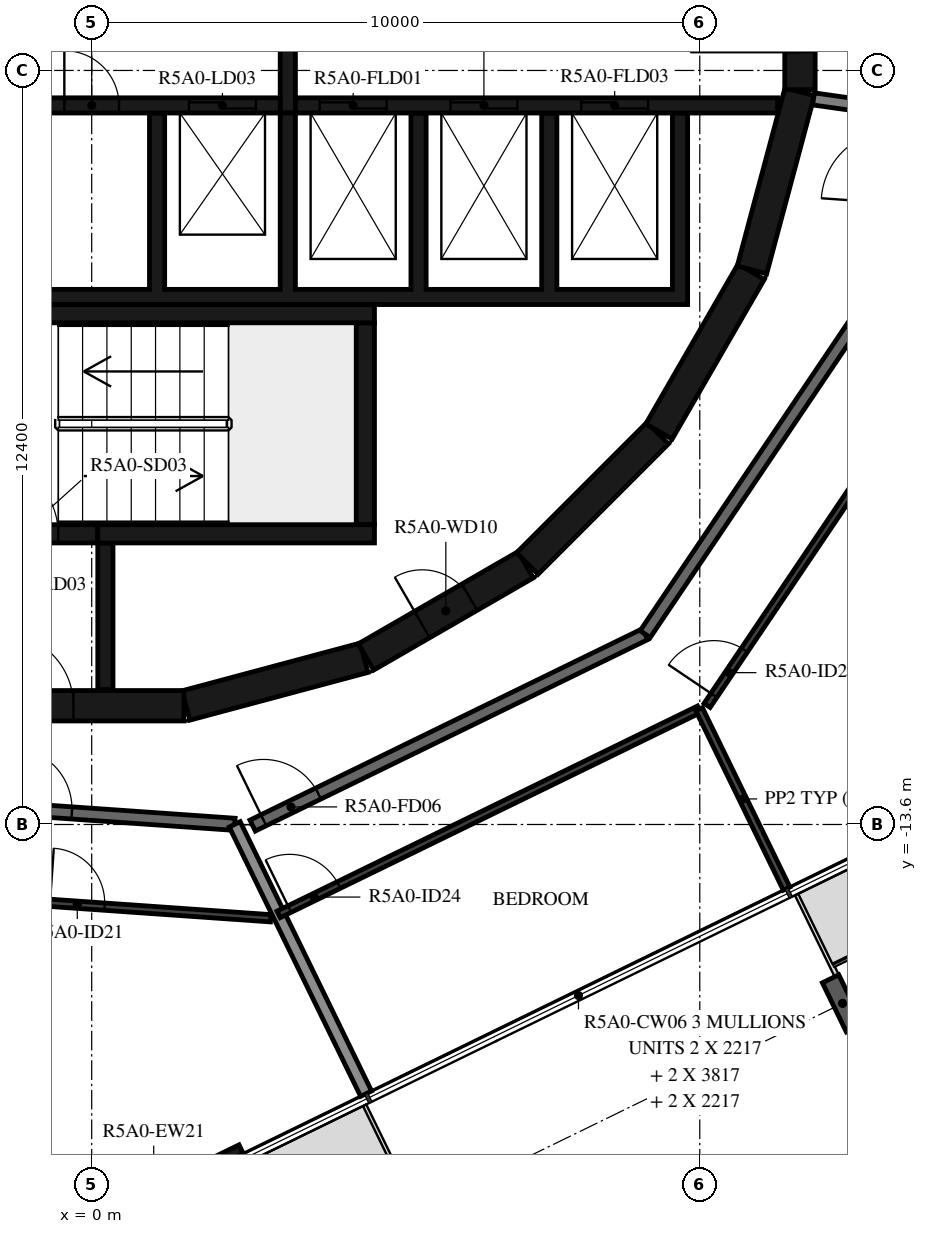
"""IFC4 building model, lengths in metres.
Left out: names, types, materials, properties, quantities, classifications, styles, units other than length and angle.
Written with IfcOpenShell. Run it as: python <this file> out.ifc"""

import sys

from ifc_helpers import new_model, si_unit, direction, frame, frame_2d, origin, origin_2d, place, context, subcontext, project, spatial, polyline, rectangle, i_section, outline, extrude, element, fill, save


model = new_model("IFC4")
c1 = context("Model", 3, precision=1e-05, world=origin(), true_north=direction((0.0, 1.0)))
c2 = subcontext(c1, "Body", "Model", "MODEL_VIEW")
j1 = project(units=[si_unit("LENGTHUNIT", "METRE"), si_unit("PLANEANGLEUNIT", "RADIAN")], contexts=[c1])
p1 = place(None, origin())
s1 = spatial("IfcSite", under=j1, at=p1, CompositionType="ELEMENT")
p2 = place(p1, origin())
s2 = spatial("IfcBuilding", under=s1, at=p2, CompositionType="ELEMENT")
p3 = place(p2, frame((0.0, 0.0, 195.4)))
s3 = spatial("IfcBuildingStorey", under=s2, at=p3, CompositionType="ELEMENT", Elevation=195.4)
p4 = place(p3, frame((12.348, -16.542, -0.38), z_axis=(0.0, 0.0, 1.0), x_axis=(-0.898794095235, -0.438371046456, 0.0)))
e1 = element("IfcColumn", 1, at=p4, inside=s3, PredefinedType="COLUMN", context=c2, shape_type="SweptSolid", body=[
    extrude(i_section(OverallWidth=0.3, OverallDepth=0.9, WebThickness=0.019, FlangeThickness=0.035, FilletRadius=0.03, at=origin_2d()), origin(), (0.0, 0.0, 1.0), 3.5),
])
p5 = place(p3, frame((-0.418, -20.343, 0.0), z_axis=(0.0, 0.0, 1.0), x_axis=(0.898778711213, 0.43840258698, 0.0)))
e2 = element("IfcWall", 2, at=p5, inside=s3, PredefinedType="STANDARD", context=c2, shape_type="SweptSolid", body=[
    extrude(rectangle(XDim=3.2, YDim=0.16, at=frame_2d((1.6, 0.0))), origin(), (0.0, 0.0, 1.0), 3.12),
])
p6 = place(p5, frame((0.4, 0.0, 0.0)))
e3 = element("IfcOpeningElement", 3, at=p6, cuts=e2, PredefinedType="OPENING", context=c2, shape_type="SweptSolid", body=[
    extrude(rectangle(XDim=2.4, YDim=2.4, at=frame_2d((1.2, 1.2))), frame((0.0, 0.09, 0.0), z_axis=(0.0, -1.0, 0.0), x_axis=(1.0, 0.0, 0.0)), (0.0, 0.0, 1.0), 0.18),
])
p7 = place(p3, frame((1.55, -11.643, 0.0), z_axis=(0.0, 0.0, 1.0), x_axis=(0.965948410781, 0.258734743916, 0.0)))
e4 = element("IfcWall", 4, at=p7, inside=s3, PredefinedType="SHEAR", context=c2, shape_type="SweptSolid", body=[
    extrude(rectangle(XDim=3.033, YDim=0.5, at=frame_2d((1.516, 0.0))), origin(), (0.0, 0.0, 1.0), 3.12),
])
p8 = place(p3, frame((4.51, -10.845, 0.0), z_axis=(0.0, 0.0, 1.0), x_axis=(0.865975092491, 0.500087131594, 0.0)))
e5 = element("IfcWall", 5, at=p8, inside=s3, PredefinedType="SHEAR", context=c2, shape_type="SweptSolid", body=[
    extrude(rectangle(XDim=3.033, YDim=0.5, at=frame_2d((1.516, 0.0))), origin(), (0.0, 0.0, 1.0), 3.12),
])
p9 = place(p8, frame((1.066, 0.0, 0.0)))
e6 = element("IfcOpeningElement", 6, at=p9, cuts=e5, PredefinedType="OPENING", context=c2, shape_type="SweptSolid", body=[
    extrude(rectangle(XDim=0.9, YDim=2.1, at=frame_2d((0.45, 1.05))), frame((0.0, 0.26, 0.0), z_axis=(0.0, -1.0, 0.0), x_axis=(1.0, 0.0, 0.0)), (0.0, 0.0, 1.0), 0.52),
])
p10 = place(p3, frame((7.164, -9.308, 0.0), z_axis=(0.0, 0.0, 1.0), x_axis=(0.707106781187, 0.707106781187, 0.0)))
e7 = element("IfcWall", 7, at=p10, inside=s3, PredefinedType="SHEAR", context=c2, shape_type="SweptSolid", body=[
    extrude(rectangle(XDim=3.032, YDim=0.5, at=frame_2d((1.516, 0.0))), origin(), (0.0, 0.0, 1.0), 3.12),
])
for number, where, z_axis, x_axis in (
    (8, (9.329, -7.137, 0.0), (0.0, 0.0, 1.0), (0.5, 0.866, 0.0)),
    (9, (10.858, -4.479, 0.0), (0.0, 0.0, 1.0), (0.259, 0.966, 0.0)),
):
    element("IfcWall", number, at=place(p3, frame(where, z_axis=z_axis, x_axis=x_axis)), inside=s3, PredefinedType="SHEAR", context=c2, shape_type="SweptSolid", body=[
        extrude(rectangle(XDim=3.033, YDim=0.5, at=frame_2d((1.516, 0.0))), origin(), (0.0, 0.0, 1.0), 3.12),
    ])
p11 = place(p3, frame((11.647, -1.516, 0.0), z_axis=(0.0, 0.0, 1.0), x_axis=(0.0, 1.0, 0.0)))
e10 = element("IfcWall", 10, at=p11, inside=s3, PredefinedType="SHEAR", context=c2, shape_type="SweptSolid", body=[
    extrude(rectangle(XDim=3.033, YDim=0.5, at=frame_2d((1.516, 0.0))), origin(), (0.0, 0.0, 1.0), 3.12),
])
p12 = place(p11, frame((0.616, 0.0, 0.0)))
e11 = element("IfcOpeningElement", 11, at=p12, cuts=e10, PredefinedType="OPENING", context=c2, shape_type="SweptSolid", body=[
    extrude(rectangle(XDim=1.8, YDim=2.1, at=frame_2d((0.9, 1.05))), frame((0.0, 0.26, 0.0), z_axis=(0.0, -1.0, 0.0), x_axis=(1.0, 0.0, 0.0)), (0.0, 0.0, 1.0), 0.52),
])
p13 = place(p3, frame((-1.516, -11.647, 0.0), z_axis=(0.0, 0.0, 1.0), x_axis=(1.0, 0.0, 0.0)))
e12 = element("IfcWall", 12, at=p13, inside=s3, PredefinedType="SHEAR", context=c2, shape_type="SweptSolid", body=[
    extrude(rectangle(XDim=3.033, YDim=0.5, at=frame_2d((1.516, 0.0))), origin(), (0.0, 0.0, 1.0), 3.12),
])
p14 = place(p13, frame((0.016, 0.0, 0.0)))
e13 = element("IfcOpeningElement", 13, at=p14, cuts=e12, PredefinedType="OPENING", context=c2, shape_type="SweptSolid", body=[
    extrude(rectangle(XDim=1.2, YDim=2.1, at=frame_2d((0.6, 1.05))), frame((0.0, 0.26, 0.0), z_axis=(0.0, -1.0, 0.0), x_axis=(1.0, 0.0, 0.0)), (0.0, 0.0, 1.0), 0.52),
])
p15 = place(p3, frame((-2.4, -5.2, 0.0), z_axis=(0.0, 0.0, 1.0), x_axis=(1.0, 0.0, 0.0)))
e14 = element("IfcWall", 14, at=p15, inside=s3, PredefinedType="SHEAR", context=c2, shape_type="SweptSolid", body=[
    extrude(rectangle(XDim=7.05, YDim=0.3, at=frame_2d((3.525, 0.0))), origin(), (0.0, 0.0, 1.0), 3.12),
])
p16 = place(p3, frame((4.5, -8.67, 0.0), z_axis=(0.0, 0.0, 1.0), x_axis=(0.0, 1.0, 0.0)))
e15 = element("IfcWall", 15, at=p16, inside=s3, PredefinedType="SHEAR", context=c2, shape_type="SweptSolid", body=[
    extrude(rectangle(XDim=3.32, YDim=0.3, at=frame_2d((1.66, 0.0))), origin(), (0.0, 0.0, 1.0), 3.12),
])
p17 = place(p3, frame((0.1, -8.82, 0.0), z_axis=(0.0, 0.0, 1.0), x_axis=(1.0, 0.0, 0.0)))
e16 = element("IfcWall", 16, at=p17, inside=s3, PredefinedType="SHEAR", context=c2, shape_type="SweptSolid", body=[
    extrude(rectangle(XDim=4.55, YDim=0.3, at=frame_2d((2.275, 0.0))), origin(), (0.0, 0.0, 1.0), 3.12),
])
p18 = place(p3, frame((-2.4, -8.82, 0.0), z_axis=(0.0, 0.0, 1.0), x_axis=(1.0, 0.0, 0.0)))
e17 = element("IfcWall", 17, at=p18, inside=s3, PredefinedType="SHEAR", context=c2, shape_type="SweptSolid", body=[
    extrude(rectangle(XDim=2.5, YDim=0.3, at=frame_2d((1.25, 0.0))), origin(), (0.0, 0.0, 1.0), 3.12),
])
p19 = place(p18, frame((0.65, 0.0, 0.0)))
e18 = element("IfcOpeningElement", 18, at=p19, cuts=e17, PredefinedType="OPENING", context=c2, shape_type="SweptSolid", body=[
    extrude(rectangle(XDim=1.2, YDim=2.1, at=frame_2d((0.6, 1.05))), frame((0.0, 0.16, 0.0), z_axis=(0.0, -1.0, 0.0), x_axis=(1.0, 0.0, 0.0)), (0.0, 0.0, 1.0), 0.32),
])
p20 = place(p3, frame((0.225, -8.97, 0.0), z_axis=(0.0, 0.0, 1.0), x_axis=(0.0, -1.0, 0.0)))
e19 = element("IfcWall", 19, at=p20, inside=s3, PredefinedType="SHEAR", context=c2, shape_type="SweptSolid", body=[
    extrude(rectangle(XDim=2.41, YDim=0.25, at=frame_2d((1.205, 0.0))), origin(), (0.0, 0.0, 1.0), 3.12),
])
p21 = place(p3, origin())
e20 = element("IfcWall", 20, at=p21, inside=s3, PredefinedType="SHEAR", context=c2, shape_type="SweptSolid", body=[
    extrude(outline(polyline([(9.8, -5.05), (9.8, -4.8), (9.8, -1.9), (9.55, -1.9), (9.55, -4.8), (7.65, -4.8), (7.65, -1.9), (7.4, -1.9), (7.4, -4.8), (5.5, -4.8), (5.5, -1.9), (5.25, -1.9), (5.25, -4.8), (3.35, -4.8), (3.35, -1.9), (3.1, -1.9), (3.1, -4.8), (1.2, -4.8), (1.2, -1.9), (0.95, -1.9), (0.95, -4.8), (-0.95, -4.8), (-0.95, -1.9), (-1.2, -1.9), (-1.2, -4.8), (-3.1, -4.8), (-3.1, -1.9), (-3.35, -1.9), (-3.35, -4.8), (-5.25, -4.8), (-5.25, -1.9), (-5.5, -1.9), (-5.5, -4.8), (-7.4, -4.8), (-7.4, -1.9), (-7.65, -1.9), (-7.65, -4.8), (-9.55, -4.8), (-9.55, -1.9), (-9.8, -1.9), (-9.8, -4.8), (-9.8, -5.05), (9.8, -5.05)])), origin(), (0.0, 0.0, 1.0), 3.12),
])
p22 = place(p3, frame((-11.28, -1.775, 0.0), z_axis=(0.0, 0.0, 1.0), x_axis=(1.0, 0.0, 0.0)))
e21 = element("IfcWall", 21, at=p22, inside=s3, PredefinedType="SHEAR", context=c2, shape_type="SweptSolid", body=[
    extrude(rectangle(XDim=14.38, YDim=0.25, at=frame_2d((7.19, 0.0))), origin(), (0.0, 0.0, 1.0), 3.12),
])
p23 = place(p22, frame((12.88, 0.0, 0.0)))
e22 = element("IfcOpeningElement", 22, at=p23, cuts=e21, PredefinedType="OPENING", context=c2, shape_type="SweptSolid", body=[
    extrude(rectangle(XDim=1.1, YDim=2.1, at=frame_2d((0.55, 1.05))), frame((0.0, 0.135, 0.0), z_axis=(0.0, -1.0, 0.0), x_axis=(1.0, 0.0, 0.0)), (0.0, 0.0, 1.0), 0.27),
])
p24 = place(p22, frame((6.53, 0.0, 0.0)))
e23 = element("IfcOpeningElement", 23, at=p24, cuts=e21, PredefinedType="OPENING", context=c2, shape_type="SweptSolid", body=[
    extrude(rectangle(XDim=0.9, YDim=2.1, at=frame_2d((0.45, 1.05))), frame((0.0, 0.135, 0.0), z_axis=(0.0, -1.0, 0.0), x_axis=(1.0, 0.0, 0.0)), (0.0, 0.0, 1.0), 0.27),
])
p25 = place(p22, frame((8.68, 0.0, 0.0)))
e24 = element("IfcOpeningElement", 24, at=p25, cuts=e21, PredefinedType="OPENING", context=c2, shape_type="SweptSolid", body=[
    extrude(rectangle(XDim=0.9, YDim=2.1, at=frame_2d((0.45, 1.05))), frame((0.0, 0.135, 0.0), z_axis=(0.0, -1.0, 0.0), x_axis=(1.0, 0.0, 0.0)), (0.0, 0.0, 1.0), 0.27),
])
p26 = place(p22, frame((10.83, 0.0, 0.0)))
e25 = element("IfcOpeningElement", 25, at=p26, cuts=e21, PredefinedType="OPENING", context=c2, shape_type="SweptSolid", body=[
    extrude(rectangle(XDim=0.9, YDim=2.1, at=frame_2d((0.45, 1.05))), frame((0.0, 0.135, 0.0), z_axis=(0.0, -1.0, 0.0), x_axis=(1.0, 0.0, 0.0)), (0.0, 0.0, 1.0), 0.27),
])
p27 = place(p3, frame((3.35, -1.775, 0.0), z_axis=(0.0, 0.0, 1.0), x_axis=(1.0, 0.0, 0.0)))
e26 = element("IfcWall", 26, at=p27, inside=s3, PredefinedType="SHEAR", context=c2, shape_type="SweptSolid", body=[
    extrude(rectangle(XDim=7.93, YDim=0.25, at=frame_2d((3.965, 0.0))), origin(), (0.0, 0.0, 1.0), 3.12),
])
p28 = place(p27, frame((0.4, 0.0, 0.0)))
e27 = element("IfcOpeningElement", 27, at=p28, cuts=e26, PredefinedType="OPENING", context=c2, shape_type="SweptSolid", body=[
    extrude(rectangle(XDim=1.1, YDim=2.4, at=frame_2d((0.55, 1.2))), frame((0.0, 0.135, 0.0), z_axis=(0.0, -1.0, 0.0), x_axis=(1.0, 0.0, 0.0)), (0.0, 0.0, 1.0), 0.27),
])
p29 = place(p27, frame((2.55, 0.0, 0.0)))
e28 = element("IfcOpeningElement", 28, at=p29, cuts=e26, PredefinedType="OPENING", context=c2, shape_type="SweptSolid", body=[
    extrude(rectangle(XDim=1.1, YDim=2.4, at=frame_2d((0.55, 1.2))), frame((0.0, 0.135, 0.0), z_axis=(0.0, -1.0, 0.0), x_axis=(1.0, 0.0, 0.0)), (0.0, 0.0, 1.0), 0.27),
])
p30 = place(p27, frame((4.7, 0.0, 0.0)))
e29 = element("IfcOpeningElement", 29, at=p30, cuts=e26, PredefinedType="OPENING", context=c2, shape_type="SweptSolid", body=[
    extrude(rectangle(XDim=1.1, YDim=2.4, at=frame_2d((0.55, 1.2))), frame((0.0, 0.135, 0.0), z_axis=(0.0, -1.0, 0.0), x_axis=(1.0, 0.0, 0.0)), (0.0, 0.0, 1.0), 0.27),
])
p31 = place(p3, frame((3.225, -1.9, 0.0), z_axis=(0.0, 0.0, 1.0), x_axis=(0.0, 1.0, 0.0)))
e30 = element("IfcWall", 30, at=p31, inside=s3, PredefinedType="SHEAR", context=c2, shape_type="SweptSolid", body=[
    extrude(rectangle(XDim=3.8, YDim=0.25, at=frame_2d((1.9, 0.0))), origin(), (0.0, 0.0, 1.0), 3.12),
])
p32 = place(p3, frame((13.302, -1.869, 0.0), z_axis=(0.0, 0.0, 1.0), x_axis=(-0.990274397042, 0.13912806533, 0.0)))
e31 = element("IfcWall", 31, at=p32, inside=s3, PredefinedType="STANDARD", context=c2, shape_type="SweptSolid", body=[
    extrude(rectangle(XDim=1.446, YDim=0.2, at=frame_2d((0.723, 0.0))), origin(), (0.0, 0.0, 1.0), 3.12),
])
p33 = place(p3, frame((-4.517, -13.117, 0.0), z_axis=(0.0, 0.0, 1.0), x_axis=(0.997564669554, -0.069747616856, 0.0)))
e32 = element("IfcWall", 32, at=p33, inside=s3, PredefinedType="STANDARD", context=c2, shape_type="SweptSolid", body=[
    extrude(rectangle(XDim=6.885, YDim=0.2, at=frame_2d((3.443, 0.0))), origin(), (0.0, 0.0, 1.0), 3.12),
])
p34 = place(p33, frame((3.2, 0.0, 0.0)))
e33 = element("IfcOpeningElement", 33, at=p34, cuts=e32, PredefinedType="OPENING", context=c2, shape_type="SweptSolid", body=[
    extrude(rectangle(XDim=1.0, YDim=2.1, at=frame_2d((0.5, 1.05))), frame((0.0, 0.11, 0.0), z_axis=(0.0, -1.0, 0.0), x_axis=(1.0, 0.0, 0.0)), (0.0, 0.0, 1.0), 0.22),
])
p35 = place(p3, frame((2.647, -13.618, 0.0), z_axis=(0.0, 0.0, 1.0), x_axis=(0.898796543751, 0.438366026218, 0.0)))
e34 = element("IfcWall", 34, at=p35, inside=s3, PredefinedType="STANDARD", context=c2, shape_type="SweptSolid", body=[
    extrude(rectangle(XDim=7.181, YDim=0.2, at=frame_2d((3.591, 0.0))), origin(), (0.0, 0.0, 1.0), 3.12),
])
p36 = place(p35, frame((0.2, 0.0, 0.0)))
e35 = element("IfcOpeningElement", 35, at=p36, cuts=e34, PredefinedType="OPENING", context=c2, shape_type="SweptSolid", body=[
    extrude(rectangle(XDim=1.0, YDim=2.1, at=frame_2d((0.5, 1.05))), frame((0.0, 0.11, 0.0), z_axis=(0.0, -1.0, 0.0), x_axis=(1.0, 0.0, 0.0)), (0.0, 0.0, 1.0), 0.22),
])
p37 = place(p3, frame((9.101, -10.47, 0.0), z_axis=(0.0, 0.0, 1.0), x_axis=(0.559195469534, 0.829035841718, 0.0)))
e36 = element("IfcWall", 36, at=p37, inside=s3, PredefinedType="STANDARD", context=c2, shape_type="SweptSolid", body=[
    extrude(rectangle(XDim=7.181, YDim=0.2, at=frame_2d((3.591, 0.0))), origin(), (0.0, 0.0, 1.0), 3.12),
])
p38 = place(p3, frame((4.512, -18.027, 0.0), z_axis=(0.0, 0.0, 1.0), x_axis=(-0.438374835386, 0.898792247241, 0.0)))
e37 = element("IfcWall", 37, at=p38, inside=s3, PredefinedType="STANDARD", context=c2, shape_type="SweptSolid", body=[
    extrude(rectangle(XDim=4.929, YDim=0.2, at=frame_2d((2.464, 0.0))), origin(), (0.0, 0.0, 1.0), 2.73),
])
p39 = place(p3, frame((-5.022, -14.585, 0.0), z_axis=(0.0, 0.0, 1.0), x_axis=(0.997565118395, -0.069741197017, 0.0)))
e38 = element("IfcWall", 38, at=p39, inside=s3, PredefinedType="PARTITIONING", context=c2, shape_type="SweptSolid", body=[
    extrude(rectangle(XDim=7.985, YDim=0.12, at=frame_2d((3.993, 0.0))), origin(), (0.0, 0.0, 1.0), 3.12),
])
p40 = place(p39, frame((4.346, 0.0, 0.0)))
e39 = element("IfcOpeningElement", 39, at=p40, cuts=e38, PredefinedType="OPENING", context=c2, shape_type="SweptSolid", body=[
    extrude(rectangle(XDim=0.9, YDim=2.1, at=frame_2d((0.45, 1.05))), frame((0.0, 0.07, 0.0), z_axis=(0.0, -1.0, 0.0), x_axis=(1.0, 0.0, 0.0)), (0.0, 0.0, 1.0), 0.14),
])
p41 = place(p3, frame((3.074, -15.078, 0.0), z_axis=(0.0, 0.0, 1.0), x_axis=(0.898800770739, 0.438357359377, 0.0)))
e40 = element("IfcWall", 40, at=p41, inside=s3, PredefinedType="PARTITIONING", context=c2, shape_type="SweptSolid", body=[
    extrude(rectangle(XDim=7.694, YDim=0.12, at=frame_2d((3.847, 0.0))), origin(), (0.0, 0.0, 1.0), 3.12),
])
p42 = place(p41, frame((0.2, 0.0, 0.0)))
e41 = element("IfcOpeningElement", 41, at=p42, cuts=e40, PredefinedType="OPENING", context=c2, shape_type="SweptSolid", body=[
    extrude(rectangle(XDim=0.9, YDim=2.1, at=frame_2d((0.45, 1.05))), frame((0.0, 0.07, 0.0), z_axis=(0.0, -1.0, 0.0), x_axis=(1.0, 0.0, 0.0)), (0.0, 0.0, 1.0), 0.14),
])
p43 = place(p3, frame((10.12, -11.642, 0.0), z_axis=(0.0, 0.0, 1.0), x_axis=(0.559201404667, 0.829031838362, 0.0)))
e42 = element("IfcWall", 42, at=p43, inside=s3, PredefinedType="PARTITIONING", context=c2, shape_type="SweptSolid", body=[
    extrude(rectangle(XDim=7.709, YDim=0.12, at=frame_2d((3.854, 0.0))), origin(), (0.0, 0.0, 1.0), 3.12),
])
p44 = place(p43, frame((0.2, 0.0, 0.0)))
e43 = element("IfcOpeningElement", 43, at=p44, cuts=e42, PredefinedType="OPENING", context=c2, shape_type="SweptSolid", body=[
    extrude(rectangle(XDim=0.9, YDim=2.1, at=frame_2d((0.45, 1.05))), frame((0.0, 0.07, 0.0), z_axis=(0.0, -1.0, 0.0), x_axis=(1.0, 0.0, 0.0)), (0.0, 0.0, 1.0), 0.14),
])
p45 = place(p3, frame((11.427, -14.654, 0.0), z_axis=(0.0, 0.0, 1.0), x_axis=(-0.438410435857, 0.898774882677, 0.0)))
e44 = element("IfcWall", 44, at=p45, inside=s3, PredefinedType="PARTITIONING", context=c2, shape_type="SweptSolid", body=[
    extrude(rectangle(XDim=3.281, YDim=0.12, at=frame_2d((1.64, 0.0))), origin(), (0.0, 0.0, 1.0), 2.73),
])
p46 = place(p19, origin())
e45 = element("IfcDoor", 45, at=p46, inside=s3, OperationType="SINGLE_SWING_LEFT", PredefinedType="DOOR", context=c2, shape_type="SweptSolid", body=[
    extrude(rectangle(XDim=1.2, YDim=2.1, at=frame_2d((0.6, 1.05))), frame((0.0, 0.025, 0.0), z_axis=(0.0, -1.0, 0.0), x_axis=(1.0, 0.0, 0.0)), (0.0, 0.0, 1.0), 0.05),
])
fill(e18, e45)
p47 = place(p14, origin())
e46 = element("IfcDoor", 46, at=p47, inside=s3, OperationType="SINGLE_SWING_RIGHT", PredefinedType="DOOR", context=c2, shape_type="SweptSolid", body=[
    extrude(rectangle(XDim=1.2, YDim=2.1, at=frame_2d((0.6, 1.05))), frame((0.0, 0.025, 0.0), z_axis=(0.0, -1.0, 0.0), x_axis=(1.0, 0.0, 0.0)), (0.0, 0.0, 1.0), 0.05),
])
fill(e13, e46)
p48 = place(p12, origin())
e47 = element("IfcDoor", 47, at=p48, inside=s3, OperationType="DOUBLE_DOOR_SINGLE_SWING", PredefinedType="DOOR", context=c2, shape_type="SweptSolid", body=[
    extrude(rectangle(XDim=1.8, YDim=2.1, at=frame_2d((0.9, 1.05))), frame((0.0, 0.025, 0.0), z_axis=(0.0, -1.0, 0.0), x_axis=(1.0, 0.0, 0.0)), (0.0, 0.0, 1.0), 0.05),
])
fill(e11, e47)
p49 = place(p23, origin())
e48 = element("IfcDoor", 48, at=p49, inside=s3, OperationType="DOUBLE_DOOR_SLIDING", PredefinedType="DOOR", context=c2, shape_type="SweptSolid", body=[
    extrude(rectangle(XDim=1.1, YDim=2.1, at=frame_2d((0.55, 1.05))), frame((0.0, 0.025, 0.0), z_axis=(0.0, -1.0, 0.0), x_axis=(1.0, 0.0, 0.0)), (0.0, 0.0, 1.0), 0.05),
])
fill(e22, e48)
p50 = place(p28, origin())
e49 = element("IfcDoor", 49, at=p50, inside=s3, OperationType="DOUBLE_DOOR_SLIDING", PredefinedType="DOOR", context=c2, shape_type="SweptSolid", body=[
    extrude(rectangle(XDim=1.1, YDim=2.4, at=frame_2d((0.55, 1.2))), frame((0.0, 0.025, 0.0), z_axis=(0.0, -1.0, 0.0), x_axis=(1.0, 0.0, 0.0)), (0.0, 0.0, 1.0), 0.05),
])
fill(e27, e49)
p51 = place(p29, origin())
e50 = element("IfcDoor", 50, at=p51, inside=s3, OperationType="DOUBLE_DOOR_SLIDING", PredefinedType="DOOR", context=c2, shape_type="SweptSolid", body=[
    extrude(rectangle(XDim=1.1, YDim=2.4, at=frame_2d((0.55, 1.2))), frame((0.0, 0.025, 0.0), z_axis=(0.0, -1.0, 0.0), x_axis=(1.0, 0.0, 0.0)), (0.0, 0.0, 1.0), 0.05),
])
fill(e28, e50)
p52 = place(p30, origin())
e51 = element("IfcDoor", 51, at=p52, inside=s3, OperationType="DOUBLE_DOOR_SLIDING", PredefinedType="DOOR", context=c2, shape_type="SweptSolid", body=[
    extrude(rectangle(XDim=1.1, YDim=2.4, at=frame_2d((0.55, 1.2))), frame((0.0, 0.025, 0.0), z_axis=(0.0, -1.0, 0.0), x_axis=(1.0, 0.0, 0.0)), (0.0, 0.0, 1.0), 0.05),
])
fill(e29, e51)
p53 = place(p26, origin())
e52 = element("IfcDoor", 52, at=p53, inside=s3, OperationType="SINGLE_SWING_RIGHT", PredefinedType="DOOR", context=c2, shape_type="SweptSolid", body=[
    extrude(rectangle(XDim=0.9, YDim=2.1, at=frame_2d((0.45, 1.05))), frame((0.0, 0.025, 0.0), z_axis=(0.0, -1.0, 0.0), x_axis=(1.0, 0.0, 0.0)), (0.0, 0.0, 1.0), 0.05),
])
fill(e25, e52)
p54 = place(p9, origin())
e53 = element("IfcDoor", 53, at=p54, inside=s3, OperationType="SINGLE_SWING_RIGHT", PredefinedType="DOOR", context=c2, shape_type="SweptSolid", body=[
    extrude(rectangle(XDim=0.9, YDim=2.1, at=frame_2d((0.45, 1.05))), frame((0.0, 0.025, 0.0), z_axis=(0.0, -1.0, 0.0), x_axis=(1.0, 0.0, 0.0)), (0.0, 0.0, 1.0), 0.05),
])
fill(e6, e53)
p55 = place(p34, origin())
e54 = element("IfcDoor", 54, at=p55, inside=s3, OperationType="SINGLE_SWING_LEFT", PredefinedType="DOOR", context=c2, shape_type="SweptSolid", body=[
    extrude(rectangle(XDim=1.0, YDim=2.1, at=frame_2d((0.5, 1.05))), frame((0.0, 0.025, 0.0), z_axis=(0.0, -1.0, 0.0), x_axis=(1.0, 0.0, 0.0)), (0.0, 0.0, 1.0), 0.05),
])
fill(e33, e54)
p56 = place(p40, origin())
e55 = element("IfcDoor", 55, at=p56, inside=s3, OperationType="SINGLE_SWING_LEFT", PredefinedType="DOOR", context=c2, shape_type="SweptSolid", body=[
    extrude(rectangle(XDim=0.9, YDim=2.1, at=frame_2d((0.45, 1.05))), frame((0.0, 0.025, 0.0), z_axis=(0.0, -1.0, 0.0), x_axis=(1.0, 0.0, 0.0)), (0.0, 0.0, 1.0), 0.05),
])
fill(e39, e55)
p57 = place(p36, origin())
e56 = element("IfcDoor", 56, at=p57, inside=s3, OperationType="SINGLE_SWING_LEFT", PredefinedType="DOOR", context=c2, shape_type="SweptSolid", body=[
    extrude(rectangle(XDim=1.0, YDim=2.1, at=frame_2d((0.5, 1.05))), frame((0.0, 0.025, 0.0), z_axis=(0.0, -1.0, 0.0), x_axis=(1.0, 0.0, 0.0)), (0.0, 0.0, 1.0), 0.05),
])
fill(e35, e56)
p58 = place(p42, origin())
e57 = element("IfcDoor", 57, at=p58, inside=s3, OperationType="SINGLE_SWING_LEFT", PredefinedType="DOOR", context=c2, shape_type="SweptSolid", body=[
    extrude(rectangle(XDim=0.9, YDim=2.1, at=frame_2d((0.45, 1.05))), frame((0.0, 0.025, 0.0), z_axis=(0.0, -1.0, 0.0), x_axis=(1.0, 0.0, 0.0)), (0.0, 0.0, 1.0), 0.05),
])
fill(e41, e57)
p59 = place(p44, origin())
e58 = element("IfcDoor", 58, at=p59, inside=s3, OperationType="SINGLE_SWING_RIGHT", PredefinedType="DOOR", context=c2, shape_type="SweptSolid", body=[
    extrude(rectangle(XDim=0.9, YDim=2.1, at=frame_2d((0.45, 1.05))), frame((0.0, 0.025, 0.0), z_axis=(0.0, -1.0, 0.0), x_axis=(1.0, 0.0, 0.0)), (0.0, 0.0, 1.0), 0.05),
])
fill(e43, e58)
save(model, sys.argv[1])
